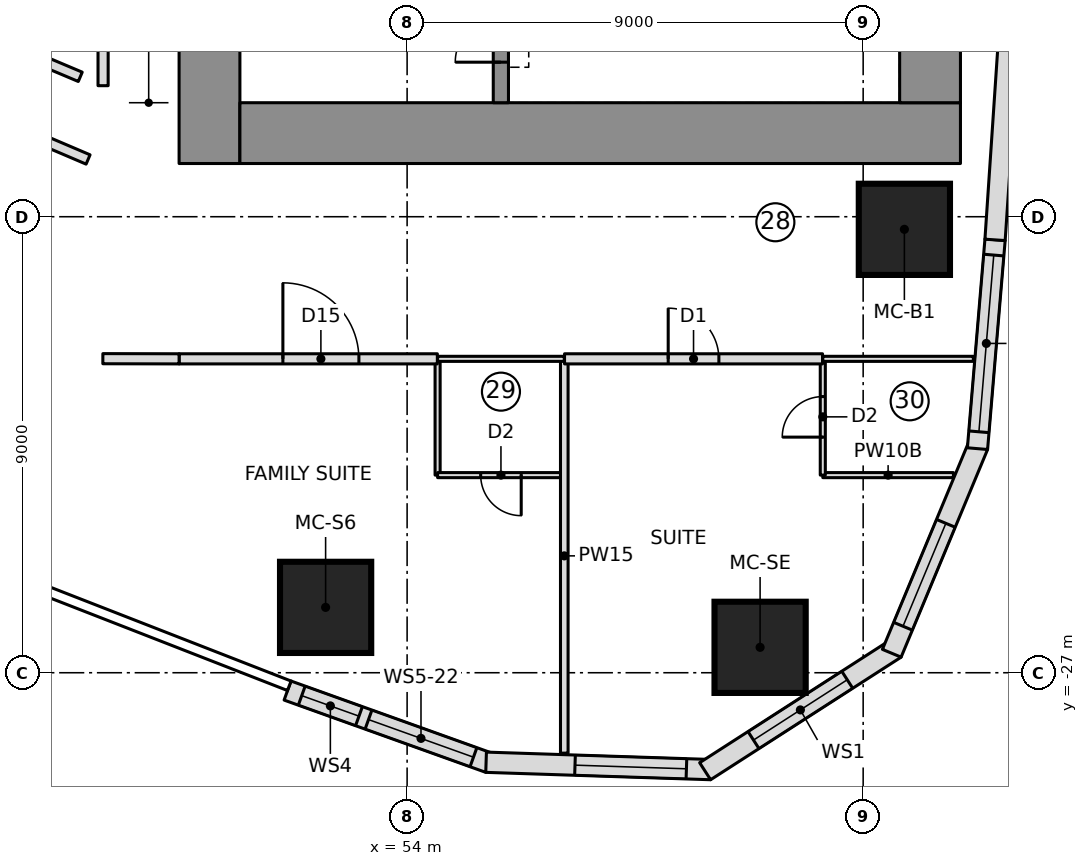
"""IFC4 building model, lengths in metres.
Left out: names, types, materials, properties, quantities, classifications, styles, units other than length and angle.
Written with IfcOpenShell. Run it as: python <this file> out.ifc"""

import sys

from ifc_helpers import new_model, si_unit, direction, frame, frame_2d, origin, origin_2d, place, context, subcontext, project, spatial, polyline, rectangle, outline, extrude, element, fill, save


model = new_model("IFC4")
c1 = context("Model", 3, precision=1e-05, world=origin(), true_north=direction((0.0, 1.0)))
c2 = subcontext(c1, "Body", "Model", "MODEL_VIEW")
j1 = project(units=[si_unit("LENGTHUNIT", "METRE"), si_unit("PLANEANGLEUNIT", "RADIAN")], contexts=[c1])
p1 = place(None, origin())
s1 = spatial("IfcSite", under=j1, at=p1, CompositionType="ELEMENT")
p2 = place(p1, origin())
s2 = spatial("IfcBuilding", under=s1, at=p2, CompositionType="ELEMENT")
p3 = place(p2, frame((0.0, 0.0, 39.6)))
s3 = spatial("IfcBuildingStorey", under=s2, at=p3, CompositionType="ELEMENT", Elevation=39.6)
p4 = place(p3, frame((50.1, -16.95, 0.0), z_axis=(0.0, 0.0, 1.0), x_axis=(0.0, 1.0, 0.0)))
e1 = element("IfcWall", 1, at=p4, inside=s3, PredefinedType="SHEAR", context=c2, shape_type="SweptSolid", body=[
    extrude(rectangle(XDim=10.3, YDim=1.2, at=frame_2d((5.15, 0.0))), origin(), (0.0, 0.0, 1.0), 3.55),
])
p5 = place(p4, frame((2.7, 0.0, 0.0)))
e2 = element("IfcOpeningElement", 2, at=p5, cuts=e1, PredefinedType="OPENING", context=c2, shape_type="SweptSolid", body=[
    extrude(rectangle(XDim=1.1, YDim=2.1, at=frame_2d((0.55, 1.05))), frame((0.0, 0.61, 0.0), z_axis=(0.0, -1.0, 0.0), x_axis=(1.0, 0.0, 0.0)), (0.0, 0.0, 1.0), 1.22),
])
p6 = place(p3, frame((50.7, -16.35, 0.0), z_axis=(0.0, 0.0, 1.0), x_axis=(1.0, 0.0, 0.0)))
e3 = element("IfcWall", 3, at=p6, inside=s3, PredefinedType="SHEAR", context=c2, shape_type="SweptSolid", body=[
    extrude(rectangle(XDim=14.22, YDim=1.2, at=frame_2d((7.11, 0.0))), origin(), (0.0, 0.0, 1.0), 3.55),
])
p7 = place(p3, frame((64.32, -15.75, 0.0), z_axis=(0.0, 0.0, 1.0), x_axis=(0.0, 1.0, 0.0)))
e4 = element("IfcWall", 4, at=p7, inside=s3, PredefinedType="SHEAR", context=c2, shape_type="SweptSolid", body=[
    extrude(rectangle(XDim=5.8, YDim=1.2, at=frame_2d((2.9, 0.0))), origin(), (0.0, 0.0, 1.0), 3.55),
])
p8 = place(p3, frame((55.85, -15.75, 0.0), z_axis=(0.0, 0.0, 1.0), x_axis=(0.0, 1.0, 0.0)))
e5 = element("IfcWall", 5, at=p8, inside=s3, PredefinedType="SHEAR", context=c2, shape_type="SweptSolid", body=[
    extrude(rectangle(XDim=5.4, YDim=0.3, at=frame_2d((2.7, 0.0))), origin(), (0.0, 0.0, 1.0), 3.55),
])
p9 = place(p8, frame((3.6, 0.0, 0.0)))
e6 = element("IfcOpeningElement", 6, at=p9, cuts=e5, PredefinedType="OPENING", context=c2, shape_type="SweptSolid", body=[
    extrude(rectangle(XDim=1.1, YDim=2.1, at=frame_2d((0.55, 1.05))), frame((0.0, 0.16, 0.0), z_axis=(0.0, -1.0, 0.0), x_axis=(1.0, 0.0, 0.0)), (0.0, 0.0, 1.0), 0.32),
])
p10 = place(p8, frame((0.8, 0.0, 0.0)))
e7 = element("IfcOpeningElement", 7, at=p10, cuts=e5, PredefinedType="OPENING", context=c2, shape_type="SweptSolid", body=[
    extrude(rectangle(XDim=0.9, YDim=2.1, at=frame_2d((0.45, 1.05))), frame((0.0, 0.16, 0.0), z_axis=(0.0, -1.0, 0.0), x_axis=(1.0, 0.0, 0.0)), (0.0, 0.0, 1.0), 0.32),
])
for number, where, z_axis, x_axis in (
    (8, (52.392, -25.71, 0.0), (0.0, 0.0, 1.0), (1.0, 0.0, 0.0)),
    (9, (60.966, -26.499, 0.0), (0.0, 0.0, 1.0), (1.0, 0.0, 0.0)),
    (10, (63.813, -18.249, 0.0), (0.0, 0.0, 1.0), (1.0, 0.0, 0.0)),
):
    element("IfcColumn", number, at=place(p3, frame(where, z_axis=z_axis, x_axis=x_axis)), inside=s3, PredefinedType="COLUMN", context=c2, shape_type="SweptSolid", body=[
        extrude(rectangle(XDim=1.8, YDim=1.8, at=origin_2d()), origin(), (0.0, 0.0, 1.0), 3.55),
    ])
p11 = place(p3, frame((51.64, -27.352, 0.0), z_axis=(0.0, 0.0, 1.0), x_axis=(0.941339752885, -0.337460323057, 0.0)))
e11 = element("IfcWall", 11, at=p11, inside=s3, PredefinedType="NOTDEFINED", context=c2, shape_type="SweptSolid", body=[
    extrude(outline(polyline([(0.0, -0.2), (4.228, -0.2), (4.165, 0.2), (0.0, 0.2), (0.0, -0.2)])), origin(), (0.0, 0.0, 1.0), 3.25),
])
p12 = place(p11, frame((0.298, 0.0, 0.9)))
e12 = element("IfcOpeningElement", 12, at=p12, cuts=e11, PredefinedType="OPENING", context=c2, shape_type="SweptSolid", body=[
    extrude(rectangle(XDim=1.2, YDim=1.8, at=frame_2d((0.6, 0.9))), frame((0.0, 0.21, 0.0), z_axis=(0.0, -1.0, 0.0), x_axis=(1.0, 0.0, 0.0)), (0.0, 0.0, 1.0), 0.42),
])
p13 = place(p11, frame((1.698, 0.0, 0.9)))
e13 = element("IfcOpeningElement", 13, at=p13, cuts=e11, PredefinedType="OPENING", context=c2, shape_type="SweptSolid", body=[
    extrude(rectangle(XDim=2.2, YDim=1.8, at=frame_2d((1.1, 0.9))), frame((0.0, 0.21, 0.0), z_axis=(0.0, -1.0, 0.0), x_axis=(1.0, 0.0, 0.0)), (0.0, 0.0, 1.0), 0.42),
])
p14 = place(p3, frame((55.59, -28.768, 0.0), z_axis=(0.0, 0.0, 1.0), x_axis=(0.999463576228, -0.032749958686, 0.0)))
e14 = element("IfcWall", 14, at=p14, inside=s3, PredefinedType="NOTDEFINED", context=c2, shape_type="SweptSolid", body=[
    extrude(outline(polyline([(-0.031, -0.2), (4.409, -0.2), (4.284, 0.2), (0.031, 0.2), (-0.031, -0.2)])), origin(), (0.0, 0.0, 1.0), 3.25),
])
p15 = place(p14, frame((1.724, 0.0, 0.6)))
e15 = element("IfcOpeningElement", 15, at=p15, cuts=e14, PredefinedType="OPENING", context=c2, shape_type="SweptSolid", body=[
    extrude(outline(polyline([(0.0, 1.35), (0.084, 1.771), (0.322, 2.128), (0.679, 2.366), (1.1, 2.45), (1.521, 2.366), (1.878, 2.128), (2.116, 1.771), (2.2, 1.35), (2.2, 1.1), (2.116, 0.679), (1.878, 0.322), (1.521, 0.084), (1.1, 0.0), (0.679, 0.084), (0.322, 0.322), (0.084, 0.679), (0.0, 1.1), (0.0, 1.35)])), frame((0.0, 0.21, 0.0), z_axis=(0.0, -1.0, 0.0), x_axis=(1.0, 0.0, 0.0)), (0.0, 0.0, 1.0), 0.42),
])
p16 = place(p3, frame((59.934, -28.91, 0.0), z_axis=(0.0, 0.0, 1.0), x_axis=(0.840937468718, 0.541132307025, 0.0)))
e16 = element("IfcWall", 16, at=p16, inside=s3, PredefinedType="NOTDEFINED", context=c2, shape_type="SweptSolid", body=[
    extrude(outline(polyline([(-0.062, -0.2), (4.409, -0.2), (4.284, 0.2), (0.062, 0.2), (-0.062, -0.2)])), origin(), (0.0, 0.0, 1.0), 3.25),
])
p17 = place(p16, frame((1.073, 0.0, 0.6)))
e17 = element("IfcOpeningElement", 17, at=p17, cuts=e16, PredefinedType="OPENING", context=c2, shape_type="SweptSolid", body=[
    extrude(outline(polyline([(0.0, 1.35), (0.084, 1.771), (0.322, 2.128), (0.679, 2.366), (1.1, 2.45), (1.521, 2.366), (1.878, 2.128), (2.116, 1.771), (2.2, 1.35), (2.2, 1.1), (2.116, 0.679), (1.878, 0.322), (1.521, 0.084), (1.1, 0.0), (0.679, 0.084), (0.322, 0.322), (0.084, 0.679), (0.0, 1.1), (0.0, 1.35)])), frame((0.0, 0.21, 0.0), z_axis=(0.0, -1.0, 0.0), x_axis=(1.0, 0.0, 0.0)), (0.0, 0.0, 1.0), 0.42),
])
p18 = place(p3, frame((63.588, -26.558, 0.0), z_axis=(0.0, 0.0, 1.0), x_axis=(0.384372042685, 0.923178277908, 0.0)))
e18 = element("IfcWall", 18, at=p18, inside=s3, PredefinedType="NOTDEFINED", context=c2, shape_type="SweptSolid", body=[
    extrude(outline(polyline([(-0.062, -0.2), (4.377, -0.2), (4.314, 0.2), (0.062, 0.2), (-0.062, -0.2)])), origin(), (0.0, 0.0, 1.0), 3.25),
])
p19 = place(p18, frame((0.515, 0.0, 0.6)))
e19 = element("IfcOpeningElement", 19, at=p19, cuts=e18, PredefinedType="OPENING", context=c2, shape_type="SweptSolid", body=[
    extrude(outline(polyline([(0.0, 1.35), (0.084, 1.771), (0.322, 2.128), (0.679, 2.366), (1.1, 2.45), (1.521, 2.366), (1.878, 2.128), (2.116, 1.771), (2.2, 1.35), (2.2, 1.1), (2.116, 0.679), (1.878, 0.322), (1.521, 0.084), (1.1, 0.0), (0.679, 0.084), (0.322, 0.322), (0.084, 0.679), (0.0, 1.1), (0.0, 1.35)])), frame((0.0, 0.21, 0.0), z_axis=(0.0, -1.0, 0.0), x_axis=(1.0, 0.0, 0.0)), (0.0, 0.0, 1.0), 0.42),
])
p20 = place(p3, frame((65.259, -22.546, 0.0), z_axis=(0.0, 0.0, 1.0), x_axis=(0.083793550906, 0.996483136248, 0.0)))
e20 = element("IfcWall", 20, at=p20, inside=s3, PredefinedType="NOTDEFINED", context=c2, shape_type="SweptSolid", body=[
    extrude(outline(polyline([(-0.031, -0.2), (4.107, -0.2), (4.104, 0.2), (0.031, 0.2), (-0.031, -0.2)])), origin(), (0.0, 0.0, 1.0), 3.25),
])
p21 = place(p20, frame((0.302, 0.0, 0.9)))
e21 = element("IfcOpeningElement", 21, at=p21, cuts=e20, PredefinedType="OPENING", context=c2, shape_type="SweptSolid", body=[
    extrude(rectangle(XDim=3.5, YDim=1.8, at=frame_2d((1.75, 0.9))), frame((0.0, 0.21, 0.0), z_axis=(0.0, -1.0, 0.0), x_axis=(1.0, 0.0, 0.0)), (0.0, 0.0, 1.0), 0.42),
])
p22 = place(p3, frame((65.603, -18.455, 0.0), z_axis=(0.0, 0.0, 1.0), x_axis=(0.067087430225, 0.997747100575, 0.0)))
e22 = element("IfcWall", 22, at=p22, inside=s3, PredefinedType="NOTDEFINED", context=c2, shape_type="SweptSolid", body=[
    extrude(outline(polyline([(-0.002, -0.2), (4.107, -0.2), (4.103, 0.2), (0.002, 0.2), (-0.002, -0.2)])), origin(), (0.0, 0.0, 1.0), 3.25),
])
p23 = place(p3, frame((54.602, -23.1, 0.0), z_axis=(0.0, 0.0, 1.0), x_axis=(0.0, 1.0, 0.0)))
e23 = element("IfcWall", 23, at=p23, inside=s3, PredefinedType="PARTITIONING", context=c2, shape_type="SweptSolid", body=[
    extrude(rectangle(XDim=2.3, YDim=0.1, at=frame_2d((1.15, 0.0))), origin(), (0.0, 0.0, 1.0), 3.25),
])
p24 = place(p3, frame((57.102, -23.1, 0.0), z_axis=(0.0, 0.0, 1.0), x_axis=(-1.0, 0.0, 0.0)))
e24 = element("IfcWall", 24, at=p24, inside=s3, PredefinedType="PARTITIONING", context=c2, shape_type="SweptSolid", body=[
    extrude(rectangle(XDim=2.5, YDim=0.1, at=frame_2d((1.25, 0.0))), origin(), (0.0, 0.0, 1.0), 3.25),
])
p25 = place(p24, frame((0.85, 0.0, 0.0)))
e25 = element("IfcOpeningElement", 25, at=p25, cuts=e24, PredefinedType="OPENING", context=c2, shape_type="SweptSolid", body=[
    extrude(rectangle(XDim=0.8, YDim=2.1, at=frame_2d((0.4, 1.05))), frame((0.0, 0.06, 0.0), z_axis=(0.0, -1.0, 0.0), x_axis=(1.0, 0.0, 0.0)), (0.0, 0.0, 1.0), 0.12),
])
p26 = place(p3, frame((64.781, -23.1, 0.0), z_axis=(0.0, 0.0, 1.0), x_axis=(-1.0, 0.0, 0.0)))
e26 = element("IfcWall", 26, at=p26, inside=s3, PredefinedType="PARTITIONING", context=c2, shape_type="SweptSolid", body=[
    extrude(rectangle(XDim=2.578, YDim=0.1, at=frame_2d((1.289, 0.0))), origin(), (0.0, 0.0, 1.0), 3.25),
])
p27 = place(p3, frame((62.203, -23.1, 0.0), z_axis=(0.0, 0.0, 1.0), x_axis=(0.0, 1.0, 0.0)))
e27 = element("IfcWall", 27, at=p27, inside=s3, PredefinedType="PARTITIONING", context=c2, shape_type="SweptSolid", body=[
    extrude(rectangle(XDim=2.3, YDim=0.1, at=frame_2d((1.15, 0.0))), origin(), (0.0, 0.0, 1.0), 3.25),
])
p28 = place(p27, frame((0.75, 0.0, 0.0)))
e28 = element("IfcOpeningElement", 28, at=p28, cuts=e27, PredefinedType="OPENING", context=c2, shape_type="SweptSolid", body=[
    extrude(rectangle(XDim=0.8, YDim=2.1, at=frame_2d((0.4, 1.05))), frame((0.0, 0.06, 0.0), z_axis=(0.0, -1.0, 0.0), x_axis=(1.0, 0.0, 0.0)), (0.0, 0.0, 1.0), 0.12),
])
p29 = place(p3, frame((57.102, -28.587, 0.0), z_axis=(0.0, 0.0, 1.0), x_axis=(0.0, 1.0, 0.0)))
e29 = element("IfcWall", 29, at=p29, inside=s3, PredefinedType="PARTITIONING", context=c2, shape_type="SweptSolid", body=[
    extrude(rectangle(XDim=7.787, YDim=0.15, at=frame_2d((3.894, 0.0))), origin(), (0.0, 0.0, 1.0), 3.25),
])
p30 = place(p3, frame((47.55, -15.239, 0.0), z_axis=(0.0, 0.0, 1.0), x_axis=(-0.921269894054, 0.388923877269, 0.0)))
e30 = element("IfcWall", 30, at=p30, inside=s3, PredefinedType="PARTITIONING", context=c2, shape_type="SweptSolid", body=[
    extrude(rectangle(XDim=4.016, YDim=0.2, at=frame_2d((2.008, 0.0))), origin(), (0.0, 0.0, 1.0), 3.25),
])
p31 = place(p3, frame((49.5, -20.805, 0.0), z_axis=(0.0, 0.0, 1.0), x_axis=(1.0, 0.0, 0.0)))
e31 = element("IfcWall", 31, at=p31, inside=s3, PredefinedType="PARTITIONING", context=c2, shape_type="SweptSolid", body=[
    extrude(rectangle(XDim=5.097, YDim=0.2, at=frame_2d((2.548, 0.0))), origin(), (0.0, 0.0, 1.0), 3.25),
])
p32 = place(p31, frame((2.048, 0.0, 0.0)))
e32 = element("IfcOpeningElement", 32, at=p32, cuts=e31, PredefinedType="OPENING", context=c2, shape_type="SweptSolid", body=[
    extrude(rectangle(XDim=1.5, YDim=2.1, at=frame_2d((0.75, 1.05))), frame((0.0, 0.11, 0.0), z_axis=(0.0, -1.0, 0.0), x_axis=(1.0, 0.0, 0.0)), (0.0, 0.0, 1.0), 0.22),
])
p33 = place(p3, frame((57.107, -20.805, 0.0), z_axis=(0.0, 0.0, 1.0), x_axis=(1.0, 0.0, 0.0)))
e33 = element("IfcWall", 33, at=p33, inside=s3, PredefinedType="PARTITIONING", context=c2, shape_type="SweptSolid", body=[
    extrude(rectangle(XDim=5.092, YDim=0.2, at=frame_2d((2.546, 0.0))), origin(), (0.0, 0.0, 1.0), 3.25),
])
p34 = place(p33, frame((2.046, 0.0, 0.0)))
e34 = element("IfcOpeningElement", 34, at=p34, cuts=e33, PredefinedType="OPENING", context=c2, shape_type="SweptSolid", body=[
    extrude(rectangle(XDim=1.0, YDim=2.1, at=frame_2d((0.5, 1.05))), frame((0.0, 0.11, 0.0), z_axis=(0.0, -1.0, 0.0), x_axis=(1.0, 0.0, 0.0)), (0.0, 0.0, 1.0), 0.22),
])
p35 = place(p3, frame((54.602, -20.805, 0.0), z_axis=(0.0, 0.0, 1.0), x_axis=(1.0, 0.0, 0.0)))
e35 = element("IfcWall", 35, at=p35, inside=s3, PredefinedType="PARTITIONING", context=c2, shape_type="SweptSolid", body=[
    extrude(rectangle(XDim=2.5, YDim=0.1, at=frame_2d((1.25, 0.0))), origin(), (0.0, 0.0, 1.0), 3.25),
])
p36 = place(p3, frame((62.203, -20.805, 0.0), z_axis=(0.0, 0.0, 1.0), x_axis=(1.0, 0.0, 0.0)))
e36 = element("IfcWall", 36, at=p36, inside=s3, PredefinedType="PARTITIONING", context=c2, shape_type="SweptSolid", body=[
    extrude(rectangle(XDim=2.971, YDim=0.1, at=frame_2d((1.486, 0.0))), origin(), (0.0, 0.0, 1.0), 3.25),
])
p37 = place(p3, frame((38.585, -12.981, 0.0), z_axis=(0.0, 0.0, 1.0), x_axis=(0.919847962482, -0.392275064103, 0.0)))
e37 = element("IfcWall", 37, at=p37, inside=s3, PredefinedType="PARTITIONING", context=c2, shape_type="SweptSolid", body=[
    extrude(rectangle(XDim=9.914, YDim=0.2, at=frame_2d((4.957, 0.0))), origin(), (0.0, 0.0, 1.0), 3.25),
])
p38 = place(p37, frame((3.05, 0.0, 0.0)))
e38 = element("IfcOpeningElement", 38, at=p38, cuts=e37, PredefinedType="OPENING", context=c2, shape_type="SweptSolid", body=[
    extrude(rectangle(XDim=1.5, YDim=2.1, at=frame_2d((0.75, 1.05))), frame((0.0, 0.11, 0.0), z_axis=(0.0, -1.0, 0.0), x_axis=(1.0, 0.0, 0.0)), (0.0, 0.0, 1.0), 0.22),
])
p39 = place(p3, frame((48.0, 15.414, 0.0), z_axis=(0.0, 0.0, 1.0), x_axis=(0.0, -1.0, 0.0)))
e39 = element("IfcWall", 39, at=p39, inside=s3, PredefinedType="PARTITIONING", context=c2, shape_type="SweptSolid", body=[
    extrude(rectangle(XDim=30.828, YDim=0.2, at=frame_2d((15.414, 0.0))), origin(), (0.0, 0.0, 1.0), 3.25),
])
p40 = place(p3, frame((47.995, -20.802, 0.0), z_axis=(0.0, 0.0, 1.0), x_axis=(0.999998104399, -0.001947099992, 0.0)))
e40 = element("IfcWall", 40, at=p40, inside=s3, PredefinedType="PARTITIONING", context=c2, shape_type="SweptSolid", body=[
    extrude(rectangle(XDim=1.505, YDim=0.2, at=frame_2d((0.752, 0.0))), origin(), (0.0, 0.0, 1.0), 3.25),
])
p41 = place(p12, origin())
e41 = element("IfcWindow", 41, at=p41, inside=s3, PartitioningType="SINGLE_PANEL", PredefinedType="WINDOW", context=c2, shape_type="SweptSolid", body=[
    extrude(rectangle(XDim=1.2, YDim=1.8, at=frame_2d((0.6, 0.9))), frame((0.0, 0.17, 0.0), z_axis=(0.0, -1.0, 0.0), x_axis=(1.0, 0.0, 0.0)), (0.0, 0.0, 1.0), 0.06),
])
fill(e12, e41)
p42 = place(p13, origin())
e42 = element("IfcWindow", 42, at=p42, inside=s3, PartitioningType="SINGLE_PANEL", PredefinedType="WINDOW", context=c2, shape_type="SweptSolid", body=[
    extrude(rectangle(XDim=2.2, YDim=1.8, at=frame_2d((1.1, 0.9))), frame((0.0, 0.17, 0.0), z_axis=(0.0, -1.0, 0.0), x_axis=(1.0, 0.0, 0.0)), (0.0, 0.0, 1.0), 0.06),
])
fill(e13, e42)
p43 = place(p15, origin())
e43 = element("IfcWindow", 43, at=p43, inside=s3, PartitioningType="SINGLE_PANEL", PredefinedType="WINDOW", context=c2, shape_type="SweptSolid", body=[
    extrude(outline(polyline([(0.0, 1.35), (0.084, 1.771), (0.322, 2.128), (0.679, 2.366), (1.1, 2.45), (1.521, 2.366), (1.878, 2.128), (2.116, 1.771), (2.2, 1.35), (2.2, 1.1), (2.116, 0.679), (1.878, 0.322), (1.521, 0.084), (1.1, 0.0), (0.679, 0.084), (0.322, 0.322), (0.084, 0.679), (0.0, 1.1), (0.0, 1.35)])), frame((0.0, 0.17, 0.0), z_axis=(0.0, -1.0, 0.0), x_axis=(1.0, 0.0, 0.0)), (0.0, 0.0, 1.0), 0.06),
])
fill(e15, e43)
p44 = place(p17, origin())
e44 = element("IfcWindow", 44, at=p44, inside=s3, PartitioningType="SINGLE_PANEL", PredefinedType="WINDOW", context=c2, shape_type="SweptSolid", body=[
    extrude(outline(polyline([(0.0, 1.35), (0.084, 1.771), (0.322, 2.128), (0.679, 2.366), (1.1, 2.45), (1.521, 2.366), (1.878, 2.128), (2.116, 1.771), (2.2, 1.35), (2.2, 1.1), (2.116, 0.679), (1.878, 0.322), (1.521, 0.084), (1.1, 0.0), (0.679, 0.084), (0.322, 0.322), (0.084, 0.679), (0.0, 1.1), (0.0, 1.35)])), frame((0.0, 0.17, 0.0), z_axis=(0.0, -1.0, 0.0), x_axis=(1.0, 0.0, 0.0)), (0.0, 0.0, 1.0), 0.06),
])
fill(e17, e44)
p45 = place(p19, origin())
e45 = element("IfcWindow", 45, at=p45, inside=s3, PartitioningType="SINGLE_PANEL", PredefinedType="WINDOW", context=c2, shape_type="SweptSolid", body=[
    extrude(outline(polyline([(0.0, 1.35), (0.084, 1.771), (0.322, 2.128), (0.679, 2.366), (1.1, 2.45), (1.521, 2.366), (1.878, 2.128), (2.116, 1.771), (2.2, 1.35), (2.2, 1.1), (2.116, 0.679), (1.878, 0.322), (1.521, 0.084), (1.1, 0.0), (0.679, 0.084), (0.322, 0.322), (0.084, 0.679), (0.0, 1.1), (0.0, 1.35)])), frame((0.0, 0.17, 0.0), z_axis=(0.0, -1.0, 0.0), x_axis=(1.0, 0.0, 0.0)), (0.0, 0.0, 1.0), 0.06),
])
fill(e19, e45)
p46 = place(p21, origin())
e46 = element("IfcWindow", 46, at=p46, inside=s3, PartitioningType="SINGLE_PANEL", PredefinedType="WINDOW", context=c2, shape_type="SweptSolid", body=[
    extrude(rectangle(XDim=3.5, YDim=1.8, at=frame_2d((1.75, 0.9))), frame((0.0, 0.17, 0.0), z_axis=(0.0, -1.0, 0.0), x_axis=(1.0, 0.0, 0.0)), (0.0, 0.0, 1.0), 0.06),
])
fill(e21, e46)
p47 = place(p25, origin())
e47 = element("IfcDoor", 47, at=p47, inside=s3, OperationType="SINGLE_SWING_LEFT", PredefinedType="DOOR", context=c2, shape_type="SweptSolid", body=[
    extrude(rectangle(XDim=0.8, YDim=2.1, at=frame_2d((0.4, 1.05))), frame((0.0, 0.025, 0.0), z_axis=(0.0, -1.0, 0.0), x_axis=(1.0, 0.0, 0.0)), (0.0, 0.0, 1.0), 0.05),
])
fill(e25, e47)
p48 = place(p28, origin())
e48 = element("IfcDoor", 48, at=p48, inside=s3, OperationType="SINGLE_SWING_LEFT", PredefinedType="DOOR", context=c2, shape_type="SweptSolid", body=[
    extrude(rectangle(XDim=0.8, YDim=2.1, at=frame_2d((0.4, 1.05))), frame((0.0, 0.025, 0.0), z_axis=(0.0, -1.0, 0.0), x_axis=(1.0, 0.0, 0.0)), (0.0, 0.0, 1.0), 0.05),
])
fill(e28, e48)
p49 = place(p32, origin())
e49 = element("IfcDoor", 49, at=p49, inside=s3, OperationType="DOUBLE_DOOR_SINGLE_SWING", PredefinedType="DOOR", context=c2, shape_type="SweptSolid", body=[
    extrude(rectangle(XDim=1.5, YDim=2.1, at=frame_2d((0.75, 1.05))), frame((0.0, 0.025, 0.0), z_axis=(0.0, -1.0, 0.0), x_axis=(1.0, 0.0, 0.0)), (0.0, 0.0, 1.0), 0.05),
])
fill(e32, e49)
p50 = place(p34, origin())
e50 = element("IfcDoor", 50, at=p50, inside=s3, OperationType="SINGLE_SWING_LEFT", PredefinedType="DOOR", context=c2, shape_type="SweptSolid", body=[
    extrude(rectangle(XDim=1.0, YDim=2.1, at=frame_2d((0.5, 1.05))), frame((0.0, 0.025, 0.0), z_axis=(0.0, -1.0, 0.0), x_axis=(1.0, 0.0, 0.0)), (0.0, 0.0, 1.0), 0.05),
])
fill(e34, e50)
p51 = place(p10, origin())
e51 = element("IfcDoor", 51, at=p51, inside=s3, OperationType="SINGLE_SWING_LEFT", PredefinedType="DOOR", context=c2, shape_type="SweptSolid", body=[
    extrude(rectangle(XDim=0.9, YDim=2.1, at=frame_2d((0.45, 1.05))), frame((0.0, 0.025, 0.0), z_axis=(0.0, -1.0, 0.0), x_axis=(1.0, 0.0, 0.0)), (0.0, 0.0, 1.0), 0.05),
])
fill(e7, e51)
save(model, sys.argv[1])
